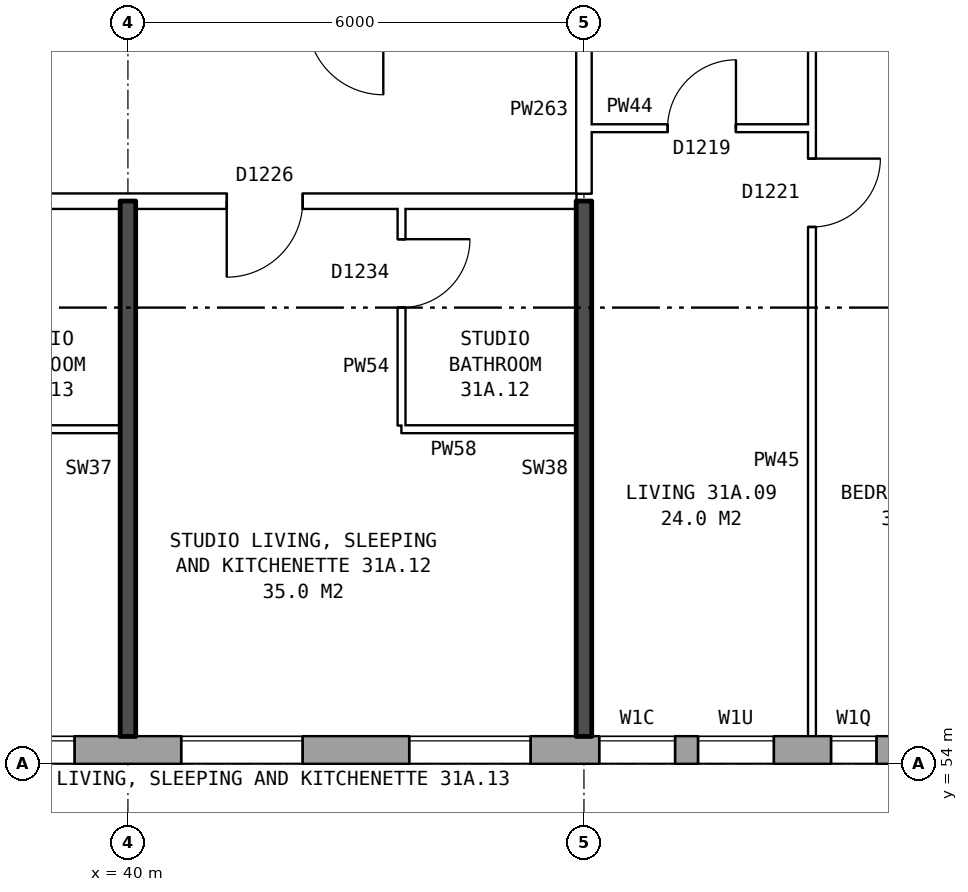
"""IFC4 building model, lengths in metres.
Left out: names, types, materials, properties, quantities, classifications, styles, units other than length and angle.
Written with IfcOpenShell. Run it as: python <this file> out.ifc"""

import sys

from ifc_helpers import new_model, si_unit, direction, frame, frame_2d, origin, place, context, subcontext, project, spatial, rectangle, extrude, element, fill, save


model = new_model("IFC4")
c1 = context("Model", 3, precision=1e-05, world=origin(), true_north=direction((0.0, 1.0)))
c2 = subcontext(c1, "Body", "Model", "MODEL_VIEW")
j1 = project(units=[si_unit("LENGTHUNIT", "METRE"), si_unit("PLANEANGLEUNIT", "RADIAN")], contexts=[c1])
p1 = place(None, origin())
s1 = spatial("IfcSite", under=j1, at=p1, CompositionType="ELEMENT")
p2 = place(p1, origin())
s2 = spatial("IfcBuilding", under=s1, at=p2, CompositionType="ELEMENT")
p3 = place(p2, frame((0.0, 0.0, 111.9)))
s3 = spatial("IfcBuildingStorey", under=s2, at=p3, CompositionType="ELEMENT", Elevation=111.9)
p4 = place(p3, frame((28.075, 54.18, 0.0), z_axis=(0.0, 0.0, 1.0), x_axis=(1.0, 0.0, 0.0)))
e1 = element("IfcWall", 1, at=p4, inside=s3, PredefinedType="STANDARD", context=c2, shape_type="SweptSolid", body=[
    extrude(rectangle(XDim=44.851, YDim=0.36, at=frame_2d((22.425, 0.0))), origin(), (0.0, 0.0, 1.0), 2.85),
])
p5 = place(p4, frame((0.625, 0.0, 0.8)))
e2 = element("IfcOpeningElement", 2, at=p5, cuts=e1, PredefinedType="OPENING", context=c2, shape_type="SweptSolid", body=[
    extrude(rectangle(XDim=1.6, YDim=1.8, at=frame_2d((0.8, 0.9))), frame((0.0, 0.19, 0.0), z_axis=(0.0, -1.0, 0.0), x_axis=(1.0, 0.0, 0.0)), (0.0, 0.0, 1.0), 0.38),
])
p6 = place(p4, frame((3.625, 0.0, 0.8)))
e3 = element("IfcOpeningElement", 3, at=p6, cuts=e1, PredefinedType="OPENING", context=c2, shape_type="SweptSolid", body=[
    extrude(rectangle(XDim=1.6, YDim=1.8, at=frame_2d((0.8, 0.9))), frame((0.0, 0.19, 0.0), z_axis=(0.0, -1.0, 0.0), x_axis=(1.0, 0.0, 0.0)), (0.0, 0.0, 1.0), 0.38),
])
p7 = place(p4, frame((6.625, 0.0, 0.8)))
e4 = element("IfcOpeningElement", 4, at=p7, cuts=e1, PredefinedType="OPENING", context=c2, shape_type="SweptSolid", body=[
    extrude(rectangle(XDim=1.6, YDim=1.8, at=frame_2d((0.8, 0.9))), frame((0.0, 0.19, 0.0), z_axis=(0.0, -1.0, 0.0), x_axis=(1.0, 0.0, 0.0)), (0.0, 0.0, 1.0), 0.38),
])
p8 = place(p4, frame((9.625, 0.0, 0.8)))
e5 = element("IfcOpeningElement", 5, at=p8, cuts=e1, PredefinedType="OPENING", context=c2, shape_type="SweptSolid", body=[
    extrude(rectangle(XDim=1.6, YDim=1.8, at=frame_2d((0.8, 0.9))), frame((0.0, 0.19, 0.0), z_axis=(0.0, -1.0, 0.0), x_axis=(1.0, 0.0, 0.0)), (0.0, 0.0, 1.0), 0.38),
])
p9 = place(p4, frame((12.625, 0.0, 0.8)))
e6 = element("IfcOpeningElement", 6, at=p9, cuts=e1, PredefinedType="OPENING", context=c2, shape_type="SweptSolid", body=[
    extrude(rectangle(XDim=1.6, YDim=1.8, at=frame_2d((0.8, 0.9))), frame((0.0, 0.19, 0.0), z_axis=(0.0, -1.0, 0.0), x_axis=(1.0, 0.0, 0.0)), (0.0, 0.0, 1.0), 0.38),
])
p10 = place(p4, frame((15.625, 0.0, 0.8)))
e7 = element("IfcOpeningElement", 7, at=p10, cuts=e1, PredefinedType="OPENING", context=c2, shape_type="SweptSolid", body=[
    extrude(rectangle(XDim=1.6, YDim=1.8, at=frame_2d((0.8, 0.9))), frame((0.0, 0.19, 0.0), z_axis=(0.0, -1.0, 0.0), x_axis=(1.0, 0.0, 0.0)), (0.0, 0.0, 1.0), 0.38),
])
p11 = place(p4, frame((18.125, 0.0, 0.8)))
e8 = element("IfcOpeningElement", 8, at=p11, cuts=e1, PredefinedType="OPENING", context=c2, shape_type="SweptSolid", body=[
    extrude(rectangle(XDim=1.0, YDim=1.8, at=frame_2d((0.5, 0.9))), frame((0.0, 0.19, 0.0), z_axis=(0.0, -1.0, 0.0), x_axis=(1.0, 0.0, 0.0)), (0.0, 0.0, 1.0), 0.38),
])
p12 = place(p4, frame((21.175, 0.0, 0.15)))
e9 = element("IfcOpeningElement", 9, at=p12, cuts=e1, PredefinedType="OPENING", context=c2, shape_type="SweptSolid", body=[
    extrude(rectangle(XDim=0.6, YDim=1.2, at=frame_2d((0.3, 0.6))), frame((0.0, 0.19, 0.0), z_axis=(0.0, -1.0, 0.0), x_axis=(1.0, 0.0, 0.0)), (0.0, 0.0, 1.0), 0.38),
])
p13 = place(p4, frame((24.425, 0.0, 1.7)))
e10 = element("IfcOpeningElement", 10, at=p13, cuts=e1, PredefinedType="OPENING", context=c2, shape_type="SweptSolid", body=[
    extrude(rectangle(XDim=1.0, YDim=0.9, at=frame_2d((0.5, 0.45))), frame((0.0, 0.19, 0.0), z_axis=(0.0, -1.0, 0.0), x_axis=(1.0, 0.0, 0.0)), (0.0, 0.0, 1.0), 0.38),
])
p14 = place(p4, frame((27.625, 0.0, 0.8)))
e11 = element("IfcOpeningElement", 11, at=p14, cuts=e1, PredefinedType="OPENING", context=c2, shape_type="SweptSolid", body=[
    extrude(rectangle(XDim=1.6, YDim=1.8, at=frame_2d((0.8, 0.9))), frame((0.0, 0.19, 0.0), z_axis=(0.0, -1.0, 0.0), x_axis=(1.0, 0.0, 0.0)), (0.0, 0.0, 1.0), 0.38),
])
p15 = place(p4, frame((30.625, 0.0, 0.8)))
e12 = element("IfcOpeningElement", 12, at=p15, cuts=e1, PredefinedType="OPENING", context=c2, shape_type="SweptSolid", body=[
    extrude(rectangle(XDim=1.6, YDim=1.8, at=frame_2d((0.8, 0.9))), frame((0.0, 0.19, 0.0), z_axis=(0.0, -1.0, 0.0), x_axis=(1.0, 0.0, 0.0)), (0.0, 0.0, 1.0), 0.38),
])
p16 = place(p4, frame((33.625, 0.0, 0.8)))
e13 = element("IfcOpeningElement", 13, at=p16, cuts=e1, PredefinedType="OPENING", context=c2, shape_type="SweptSolid", body=[
    extrude(rectangle(XDim=1.6, YDim=1.8, at=frame_2d((0.8, 0.9))), frame((0.0, 0.19, 0.0), z_axis=(0.0, -1.0, 0.0), x_axis=(1.0, 0.0, 0.0)), (0.0, 0.0, 1.0), 0.38),
])
p17 = place(p4, frame((36.625, 0.0, 0.8)))
e14 = element("IfcOpeningElement", 14, at=p17, cuts=e1, PredefinedType="OPENING", context=c2, shape_type="SweptSolid", body=[
    extrude(rectangle(XDim=1.6, YDim=1.8, at=frame_2d((0.8, 0.9))), frame((0.0, 0.19, 0.0), z_axis=(0.0, -1.0, 0.0), x_axis=(1.0, 0.0, 0.0)), (0.0, 0.0, 1.0), 0.38),
])
p18 = place(p4, frame((39.625, 0.0, 0.8)))
e15 = element("IfcOpeningElement", 15, at=p18, cuts=e1, PredefinedType="OPENING", context=c2, shape_type="SweptSolid", body=[
    extrude(rectangle(XDim=1.6, YDim=1.8, at=frame_2d((0.8, 0.9))), frame((0.0, 0.19, 0.0), z_axis=(0.0, -1.0, 0.0), x_axis=(1.0, 0.0, 0.0)), (0.0, 0.0, 1.0), 0.38),
])
p19 = place(p4, frame((42.625, 0.0, 0.8)))
e16 = element("IfcOpeningElement", 16, at=p19, cuts=e1, PredefinedType="OPENING", context=c2, shape_type="SweptSolid", body=[
    extrude(rectangle(XDim=1.6, YDim=1.8, at=frame_2d((0.8, 0.9))), frame((0.0, 0.19, 0.0), z_axis=(0.0, -1.0, 0.0), x_axis=(1.0, 0.0, 0.0)), (0.0, 0.0, 1.0), 0.38),
])
p20 = place(p4, frame((19.425, 0.0, 1.7)))
e17 = element("IfcOpeningElement", 17, at=p20, cuts=e1, PredefinedType="OPENING", context=c2, shape_type="SweptSolid", body=[
    extrude(rectangle(XDim=1.0, YDim=0.9, at=frame_2d((0.5, 0.45))), frame((0.0, 0.19, 0.0), z_axis=(0.0, -1.0, 0.0), x_axis=(1.0, 0.0, 0.0)), (0.0, 0.0, 1.0), 0.38),
])
p21 = place(p4, frame((22.075, 0.0, 0.15)))
e18 = element("IfcOpeningElement", 18, at=p21, cuts=e1, PredefinedType="OPENING", context=c2, shape_type="SweptSolid", body=[
    extrude(rectangle(XDim=1.6, YDim=1.2, at=frame_2d((0.8, 0.6))), frame((0.0, 0.19, 0.0), z_axis=(0.0, -1.0, 0.0), x_axis=(1.0, 0.0, 0.0)), (0.0, 0.0, 1.0), 0.38),
])
p22 = place(p4, frame((25.725, 0.0, 0.8)))
e19 = element("IfcOpeningElement", 19, at=p22, cuts=e1, PredefinedType="OPENING", context=c2, shape_type="SweptSolid", body=[
    extrude(rectangle(XDim=1.0, YDim=1.8, at=frame_2d((0.5, 0.9))), frame((0.0, 0.19, 0.0), z_axis=(0.0, -1.0, 0.0), x_axis=(1.0, 0.0, 0.0)), (0.0, 0.0, 1.0), 0.38),
])
for number, where, z_axis, x_axis in (
    (20, (37.6, 58.4, 0.0), (0.0, 0.0, 1.0), (1.0, 0.0, 0.0)),
    (21, (43.6, 58.4, 0.0), (0.0, 0.0, 1.0), (1.0, 0.0, 0.0)),
):
    element("IfcWall", number, at=place(p3, frame(where, z_axis=z_axis, x_axis=x_axis)), inside=s3, PredefinedType="PARTITIONING", context=c2, shape_type="SweptSolid", body=[
        extrude(rectangle(XDim=2.3, YDim=0.1, at=frame_2d((1.15, 0.0))), origin(), (0.0, 0.0, 1.0), 2.85),
    ])
p23 = place(p3, frame((25.36, 61.4, 0.0), z_axis=(0.0, 0.0, 1.0), x_axis=(1.0, 0.0, 0.0)))
e22 = element("IfcWall", 22, at=p23, inside=s3, PredefinedType="PARTITIONING", context=c2, shape_type="SweptSolid", body=[
    extrude(rectangle(XDim=20.54, YDim=0.2, at=frame_2d((10.27, 0.0))), origin(), (0.0, 0.0, 1.0), 2.85),
])
p24 = place(p23, frame((15.94, 0.0, 0.0)))
e23 = element("IfcOpeningElement", 23, at=p24, cuts=e22, PredefinedType="OPENING", context=c2, shape_type="SweptSolid", body=[
    extrude(rectangle(XDim=1.0, YDim=2.1, at=frame_2d((0.5, 1.05))), frame((0.0, 0.11, 0.0), z_axis=(0.0, -1.0, 0.0), x_axis=(1.0, 0.0, 0.0)), (0.0, 0.0, 1.0), 0.22),
])
p25 = place(p23, frame((9.94, 0.0, 0.0)))
e24 = element("IfcOpeningElement", 24, at=p25, cuts=e22, PredefinedType="OPENING", context=c2, shape_type="SweptSolid", body=[
    extrude(rectangle(XDim=1.0, YDim=2.1, at=frame_2d((0.5, 1.05))), frame((0.0, 0.11, 0.0), z_axis=(0.0, -1.0, 0.0), x_axis=(1.0, 0.0, 0.0)), (0.0, 0.0, 1.0), 0.22),
])
p26 = place(p23, frame((2.62, 0.0, 0.0)))
e25 = element("IfcOpeningElement", 25, at=p26, cuts=e22, PredefinedType="OPENING", context=c2, shape_type="SweptSolid", body=[
    extrude(rectangle(XDim=1.0, YDim=2.1, at=frame_2d((0.5, 1.05))), frame((0.0, 0.11, 0.0), z_axis=(0.0, -1.0, 0.0), x_axis=(1.0, 0.0, 0.0)), (0.0, 0.0, 1.0), 0.22),
])
p27 = place(p3, frame((46.1, 62.36, 0.0), z_axis=(0.0, 0.0, 1.0), x_axis=(1.0, 0.0, 0.0)))
e26 = element("IfcWall", 26, at=p27, inside=s3, PredefinedType="PARTITIONING", context=c2, shape_type="SweptSolid", body=[
    extrude(rectangle(XDim=2.9, YDim=0.1, at=frame_2d((1.45, 0.0))), origin(), (0.0, 0.0, 1.0), 2.85),
])
p28 = place(p27, frame((1.0, 0.0, 0.0)))
e27 = element("IfcOpeningElement", 27, at=p28, cuts=e26, PredefinedType="OPENING", context=c2, shape_type="SweptSolid", body=[
    extrude(rectangle(XDim=0.9, YDim=2.1, at=frame_2d((0.45, 1.05))), frame((0.0, 0.06, 0.0), z_axis=(0.0, -1.0, 0.0), x_axis=(1.0, 0.0, 0.0)), (0.0, 0.0, 1.0), 0.12),
])
p29 = place(p3, frame((40.0, 54.36, 0.0), z_axis=(0.0, 0.0, 1.0), x_axis=(0.0, 1.0, 0.0)))
e28 = element("IfcWall", 28, at=p29, inside=s3, PredefinedType="SOLIDWALL", context=c2, shape_type="SweptSolid", body=[
    extrude(rectangle(XDim=7.04, YDim=0.2, at=frame_2d((3.52, 0.0))), origin(), (0.0, 0.0, 1.0), 2.85),
])
p30 = place(p3, frame((43.6, 58.45, 0.0), z_axis=(0.0, 0.0, 1.0), x_axis=(0.0, 1.0, 0.0)))
e29 = element("IfcWall", 29, at=p30, inside=s3, PredefinedType="PARTITIONING", context=c2, shape_type="SweptSolid", body=[
    extrude(rectangle(XDim=2.85, YDim=0.1, at=frame_2d((1.425, 0.0))), origin(), (0.0, 0.0, 1.0), 2.85),
])
p31 = place(p30, frame((1.55, 0.0, 0.0)))
e30 = element("IfcOpeningElement", 30, at=p31, cuts=e29, PredefinedType="OPENING", context=c2, shape_type="SweptSolid", body=[
    extrude(rectangle(XDim=0.9, YDim=2.1, at=frame_2d((0.45, 1.05))), frame((0.0, 0.06, 0.0), z_axis=(0.0, -1.0, 0.0), x_axis=(1.0, 0.0, 0.0)), (0.0, 0.0, 1.0), 0.12),
])
p32 = place(p3, frame((46.0, 54.36, 0.0), z_axis=(0.0, 0.0, 1.0), x_axis=(0.0, 1.0, 0.0)))
e31 = element("IfcWall", 31, at=p32, inside=s3, PredefinedType="SOLIDWALL", context=c2, shape_type="SweptSolid", body=[
    extrude(rectangle(XDim=7.04, YDim=0.2, at=frame_2d((3.52, 0.0))), origin(), (0.0, 0.0, 1.0), 2.85),
])
p33 = place(p3, frame((46.0, 61.5, 0.0), z_axis=(0.0, 0.0, 1.0), x_axis=(0.0, 1.0, 0.0)))
e32 = element("IfcWall", 32, at=p33, inside=s3, PredefinedType="PARTITIONING", context=c2, shape_type="SweptSolid", body=[
    extrude(rectangle(XDim=2.2, YDim=0.2, at=frame_2d((1.1, 0.0))), origin(), (0.0, 0.0, 1.0), 2.85),
])
p34 = place(p3, frame((49.0, 54.36, 0.0), z_axis=(0.0, 0.0, 1.0), x_axis=(0.0, 1.0, 0.0)))
e33 = element("IfcWall", 33, at=p34, inside=s3, PredefinedType="PARTITIONING", context=c2, shape_type="SweptSolid", body=[
    extrude(rectangle(XDim=14.34, YDim=0.1, at=frame_2d((7.17, 0.0))), origin(), (0.0, 0.0, 1.0), 2.85),
])
p35 = place(p34, frame((6.7, 0.0, 0.0)))
e34 = element("IfcOpeningElement", 34, at=p35, cuts=e33, PredefinedType="OPENING", context=c2, shape_type="SweptSolid", body=[
    extrude(rectangle(XDim=0.9, YDim=2.1, at=frame_2d((0.45, 1.05))), frame((0.0, 0.06, 0.0), z_axis=(0.0, -1.0, 0.0), x_axis=(1.0, 0.0, 0.0)), (0.0, 0.0, 1.0), 0.12),
])
p36 = place(p34, frame((13.04, 0.0, 0.0)))
e35 = element("IfcOpeningElement", 35, at=p36, cuts=e33, PredefinedType="OPENING", context=c2, shape_type="SweptSolid", body=[
    extrude(rectangle(XDim=0.9, YDim=2.1, at=frame_2d((0.45, 1.05))), frame((0.0, 0.06, 0.0), z_axis=(0.0, -1.0, 0.0), x_axis=(1.0, 0.0, 0.0)), (0.0, 0.0, 1.0), 0.12),
])
p37 = place(p8, origin())
e36 = element("IfcWindow", 36, at=p37, inside=s3, PartitioningType="SINGLE_PANEL", PredefinedType="WINDOW", context=c2, shape_type="SweptSolid", body=[
    extrude(rectangle(XDim=1.6, YDim=1.8, at=frame_2d((0.8, 0.9))), frame((0.0, 0.15, 0.0), z_axis=(0.0, -1.0, 0.0), x_axis=(1.0, 0.0, 0.0)), (0.0, 0.0, 1.0), 0.06),
])
fill(e5, e36)
p38 = place(p9, origin())
e37 = element("IfcWindow", 37, at=p38, inside=s3, PartitioningType="SINGLE_PANEL", PredefinedType="WINDOW", context=c2, shape_type="SweptSolid", body=[
    extrude(rectangle(XDim=1.6, YDim=1.8, at=frame_2d((0.8, 0.9))), frame((0.0, 0.15, 0.0), z_axis=(0.0, -1.0, 0.0), x_axis=(1.0, 0.0, 0.0)), (0.0, 0.0, 1.0), 0.06),
])
fill(e6, e37)
p39 = place(p10, origin())
e38 = element("IfcWindow", 38, at=p39, inside=s3, PartitioningType="SINGLE_PANEL", PredefinedType="WINDOW", context=c2, shape_type="SweptSolid", body=[
    extrude(rectangle(XDim=1.6, YDim=1.8, at=frame_2d((0.8, 0.9))), frame((0.0, 0.15, 0.0), z_axis=(0.0, -1.0, 0.0), x_axis=(1.0, 0.0, 0.0)), (0.0, 0.0, 1.0), 0.06),
])
fill(e7, e38)
p40 = place(p11, origin())
e39 = element("IfcWindow", 39, at=p40, inside=s3, PartitioningType="SINGLE_PANEL", PredefinedType="WINDOW", context=c2, shape_type="SweptSolid", body=[
    extrude(rectangle(XDim=1.0, YDim=1.8, at=frame_2d((0.5, 0.9))), frame((0.0, 0.15, 0.0), z_axis=(0.0, -1.0, 0.0), x_axis=(1.0, 0.0, 0.0)), (0.0, 0.0, 1.0), 0.06),
])
fill(e8, e39)
p41 = place(p12, origin())
e40 = element("IfcWindow", 40, at=p41, inside=s3, PartitioningType="SINGLE_PANEL", PredefinedType="WINDOW", context=c2, shape_type="SweptSolid", body=[
    extrude(rectangle(XDim=0.6, YDim=1.2, at=frame_2d((0.3, 0.6))), frame((0.0, 0.15, 0.0), z_axis=(0.0, -1.0, 0.0), x_axis=(1.0, 0.0, 0.0)), (0.0, 0.0, 1.0), 0.06),
])
fill(e9, e40)
p42 = place(p35, frame((0.9, 0.0, 0.0), z_axis=(0.0, 0.0, 1.0), x_axis=(-1.0, 0.0, 0.0)))
e41 = element("IfcDoor", 41, at=p42, inside=s3, OperationType="SINGLE_SWING_LEFT", PredefinedType="DOOR", context=c2, shape_type="SweptSolid", body=[
    extrude(rectangle(XDim=0.9, YDim=2.1, at=frame_2d((0.45, 1.05))), frame((0.0, 0.025, 0.0), z_axis=(0.0, -1.0, 0.0), x_axis=(1.0, 0.0, 0.0)), (0.0, 0.0, 1.0), 0.05),
])
fill(e34, e41)
p43 = place(p28, origin())
e42 = element("IfcDoor", 42, at=p43, inside=s3, OperationType="SINGLE_SWING_RIGHT", PredefinedType="DOOR", context=c2, shape_type="SweptSolid", body=[
    extrude(rectangle(XDim=0.9, YDim=2.1, at=frame_2d((0.45, 1.05))), frame((0.0, 0.025, 0.0), z_axis=(0.0, -1.0, 0.0), x_axis=(1.0, 0.0, 0.0)), (0.0, 0.0, 1.0), 0.05),
])
fill(e27, e42)
p44 = place(p24, frame((1.0, 0.0, 0.0), z_axis=(0.0, 0.0, 1.0), x_axis=(-1.0, 0.0, 0.0)))
e43 = element("IfcDoor", 43, at=p44, inside=s3, OperationType="SINGLE_SWING_RIGHT", PredefinedType="DOOR", context=c2, shape_type="SweptSolid", body=[
    extrude(rectangle(XDim=1.0, YDim=2.1, at=frame_2d((0.5, 1.05))), frame((0.0, 0.025, 0.0), z_axis=(0.0, -1.0, 0.0), x_axis=(1.0, 0.0, 0.0)), (0.0, 0.0, 1.0), 0.05),
])
fill(e23, e43)
p45 = place(p31, frame((0.9, 0.0, 0.0), z_axis=(0.0, 0.0, 1.0), x_axis=(-1.0, 0.0, 0.0)))
e44 = element("IfcDoor", 44, at=p45, inside=s3, OperationType="SINGLE_SWING_LEFT", PredefinedType="DOOR", context=c2, shape_type="SweptSolid", body=[
    extrude(rectangle(XDim=0.9, YDim=2.1, at=frame_2d((0.45, 1.05))), frame((0.0, 0.025, 0.0), z_axis=(0.0, -1.0, 0.0), x_axis=(1.0, 0.0, 0.0)), (0.0, 0.0, 1.0), 0.05),
])
fill(e30, e44)
p46 = place(p20, origin())
e45 = element("IfcWindow", 45, at=p46, inside=s3, PartitioningType="SINGLE_PANEL", PredefinedType="WINDOW", context=c2, shape_type="SweptSolid", body=[
    extrude(rectangle(XDim=1.0, YDim=0.9, at=frame_2d((0.5, 0.45))), frame((0.0, 0.15, 0.0), z_axis=(0.0, -1.0, 0.0), x_axis=(1.0, 0.0, 0.0)), (0.0, 0.0, 1.0), 0.06),
])
fill(e17, e45)
save(model, sys.argv[1])
